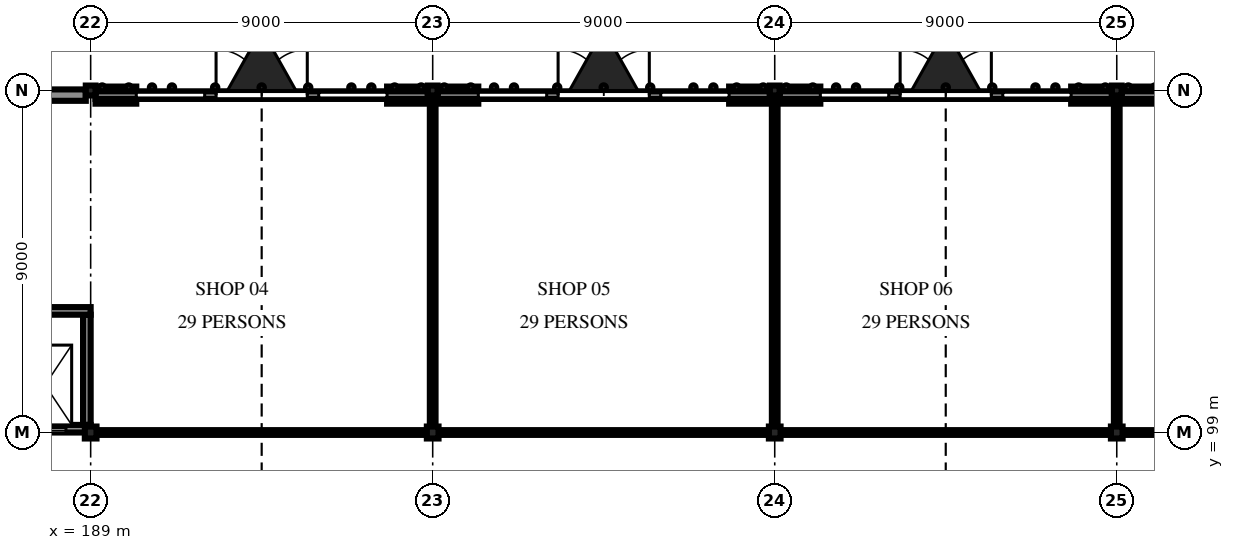
"""IFC4 building model, lengths in metres.
Left out: names, types, materials, properties, quantities, classifications, styles, units other than length and angle.
Written with IfcOpenShell. Run it as: python <this file> out.ifc"""

import sys

from ifc_helpers import new_model, si_unit, direction, frame, frame_2d, origin, origin_2d, place, context, subcontext, project, spatial, polyline, rectangle, i_section, outline, extrude, element, fill, save


model = new_model("IFC4")
c1 = context("Model", 3, precision=1e-05, world=origin(), true_north=direction((0.0, 1.0)))
c2 = subcontext(c1, "Body", "Model", "MODEL_VIEW")
j1 = project(units=[si_unit("LENGTHUNIT", "METRE"), si_unit("PLANEANGLEUNIT", "RADIAN")], contexts=[c1])
p1 = place(None, origin())
s1 = spatial("IfcSite", under=j1, at=p1, CompositionType="ELEMENT")
p2 = place(p1, origin())
s2 = spatial("IfcBuilding", under=s1, at=p2, CompositionType="ELEMENT")
p3 = place(p2, origin())
s3 = spatial("IfcBuildingStorey", under=s2, at=p3, CompositionType="ELEMENT", Elevation=0.0)
p4 = place(p3, frame((189.0, 99.0, -2.1), z_axis=(0.0, 0.0, 1.0), x_axis=(1.0, 0.0, 0.0)))
e1 = element("IfcColumn", 1, at=p4, inside=s3, PredefinedType="COLUMN", context=c2, shape_type="SweptSolid", body=[
    extrude(i_section(OverallWidth=0.307, OverallDepth=0.314, WebThickness=0.012, FlangeThickness=0.019, FilletRadius=0.015, at=origin_2d()), origin(), (0.0, 0.0, 1.0), 9.6),
])
p5 = place(p3, frame((189.0, 108.0, -2.1), z_axis=(0.0, 0.0, 1.0), x_axis=(1.0, 0.0, 0.0)))
e2 = element("IfcColumn", 2, at=p5, inside=s3, PredefinedType="COLUMN", context=c2, shape_type="SweptSolid", body=[
    extrude(i_section(OverallWidth=0.256, OverallDepth=0.26, WebThickness=0.01, FlangeThickness=0.017, FilletRadius=0.013, at=origin_2d()), origin(), (0.0, 0.0, 1.0), 9.6),
])
p6 = place(p3, frame((198.0, 99.0, -2.1), z_axis=(0.0, 0.0, 1.0), x_axis=(1.0, 0.0, 0.0)))
e3 = element("IfcColumn", 3, at=p6, inside=s3, PredefinedType="COLUMN", context=c2, shape_type="SweptSolid", body=[
    extrude(i_section(OverallWidth=0.307, OverallDepth=0.314, WebThickness=0.012, FlangeThickness=0.019, FilletRadius=0.015, at=origin_2d()), origin(), (0.0, 0.0, 1.0), 9.6),
])
p7 = place(p3, frame((198.0, 108.0, -2.1), z_axis=(0.0, 0.0, 1.0), x_axis=(1.0, 0.0, 0.0)))
e4 = element("IfcColumn", 4, at=p7, inside=s3, PredefinedType="COLUMN", context=c2, shape_type="SweptSolid", body=[
    extrude(i_section(OverallWidth=0.256, OverallDepth=0.26, WebThickness=0.01, FlangeThickness=0.017, FilletRadius=0.013, at=origin_2d()), origin(), (0.0, 0.0, 1.0), 9.6),
])
p8 = place(p3, frame((207.0, 99.0, -2.1), z_axis=(0.0, 0.0, 1.0), x_axis=(1.0, 0.0, 0.0)))
e5 = element("IfcColumn", 5, at=p8, inside=s3, PredefinedType="COLUMN", context=c2, shape_type="SweptSolid", body=[
    extrude(i_section(OverallWidth=0.307, OverallDepth=0.314, WebThickness=0.012, FlangeThickness=0.019, FilletRadius=0.015, at=origin_2d()), origin(), (0.0, 0.0, 1.0), 9.6),
])
p9 = place(p3, frame((207.0, 108.0, -2.1), z_axis=(0.0, 0.0, 1.0), x_axis=(1.0, 0.0, 0.0)))
e6 = element("IfcColumn", 6, at=p9, inside=s3, PredefinedType="COLUMN", context=c2, shape_type="SweptSolid", body=[
    extrude(i_section(OverallWidth=0.256, OverallDepth=0.26, WebThickness=0.01, FlangeThickness=0.017, FilletRadius=0.013, at=origin_2d()), origin(), (0.0, 0.0, 1.0), 9.6),
])
p10 = place(p3, frame((216.0, 99.0, -2.1), z_axis=(0.0, 0.0, 1.0), x_axis=(1.0, 0.0, 0.0)))
e7 = element("IfcColumn", 7, at=p10, inside=s3, PredefinedType="COLUMN", context=c2, shape_type="SweptSolid", body=[
    extrude(i_section(OverallWidth=0.307, OverallDepth=0.314, WebThickness=0.012, FlangeThickness=0.019, FilletRadius=0.015, at=origin_2d()), origin(), (0.0, 0.0, 1.0), 9.6),
])
p11 = place(p3, frame((216.0, 108.0, -2.1), z_axis=(0.0, 0.0, 1.0), x_axis=(1.0, 0.0, 0.0)))
e8 = element("IfcColumn", 8, at=p11, inside=s3, PredefinedType="COLUMN", context=c2, shape_type="SweptSolid", body=[
    extrude(i_section(OverallWidth=0.256, OverallDepth=0.26, WebThickness=0.01, FlangeThickness=0.017, FilletRadius=0.013, at=origin_2d()), origin(), (0.0, 0.0, 1.0), 9.6),
])
p12 = place(p3, frame((180.128, 107.878, 0.0), z_axis=(0.0, 0.0, 1.0), x_axis=(1.0, 0.0, 0.0)))
e9 = element("IfcWall", 9, at=p12, inside=s3, PredefinedType="SOLIDWALL", context=c2, shape_type="SweptSolid", body=[
    extrude(rectangle(XDim=8.744, YDim=0.3, at=frame_2d((4.372, 0.0))), origin(), (0.0, 0.0, 1.0), 6.692),
])
p13 = place(p12, frame((0.472, 0.0, 0.0)))
e10 = element("IfcOpeningElement", 10, at=p13, cuts=e9, PredefinedType="OPENING", context=c2, shape_type="SweptSolid", body=[
    extrude(rectangle(XDim=1.8, YDim=2.4, at=frame_2d((0.9, 1.2))), frame((0.0, 0.16, 0.0), z_axis=(0.0, -1.0, 0.0), x_axis=(1.0, 0.0, 0.0)), (0.0, 0.0, 1.0), 0.32),
])
p14 = place(p12, frame((0.772, 0.0, 2.55)))
e11 = element("IfcOpeningElement", 11, at=p14, cuts=e9, PredefinedType="OPENING", context=c2, shape_type="SweptSolid", body=[
    extrude(rectangle(XDim=1.2, YDim=0.6, at=frame_2d((0.6, 0.3))), frame((0.0, 0.16, 0.0), z_axis=(0.0, -1.0, 0.0), x_axis=(1.0, 0.0, 0.0)), (0.0, 0.0, 1.0), 0.32),
])
p15 = place(p12, frame((3.922, 0.0, 1.2)))
e12 = element("IfcOpeningElement", 12, at=p15, cuts=e9, PredefinedType="OPENING", context=c2, shape_type="SweptSolid", body=[
    extrude(rectangle(XDim=0.9, YDim=1.8, at=frame_2d((0.45, 0.9))), frame((0.0, 0.16, 0.0), z_axis=(0.0, -1.0, 0.0), x_axis=(1.0, 0.0, 0.0)), (0.0, 0.0, 1.0), 0.32),
])
p16 = place(p3, frame((189.128, 107.878, 0.0), z_axis=(0.0, 0.0, 1.0), x_axis=(1.0, 0.0, 0.0)))
e13 = element("IfcWall", 13, at=p16, inside=s3, PredefinedType="SOLIDWALL", context=c2, shape_type="SweptSolid", body=[
    extrude(rectangle(XDim=1.072, YDim=0.45, at=frame_2d((0.536, 0.0))), origin(), (0.0, 0.0, 1.0), 4.5),
])
p17 = place(p3, frame((192.0, 107.878, 0.0), z_axis=(0.0, 0.0, 1.0), x_axis=(1.0, 0.0, 0.0)))
e14 = element("IfcWall", 14, at=p17, inside=s3, PredefinedType="ELEMENTEDWALL", context=c2, shape_type="SweptSolid", body=[
    extrude(rectangle(XDim=3.0, YDim=0.15, at=frame_2d((1.5, 0.0))), origin(), (0.0, 0.0, 1.0), 4.5),
])
p18 = place(p17, frame((0.3, 0.0, 0.0)))
e15 = element("IfcOpeningElement", 15, at=p18, cuts=e14, PredefinedType="OPENING", context=c2, shape_type="SweptSolid", body=[
    extrude(rectangle(XDim=2.4, YDim=2.7, at=frame_2d((1.2, 1.35))), frame((0.0, 0.085, 0.0), z_axis=(0.0, -1.0, 0.0), x_axis=(1.0, 0.0, 0.0)), (0.0, 0.0, 1.0), 0.17),
])
p19 = place(p3, frame((196.8, 107.878, 0.0), z_axis=(0.0, 0.0, 1.0), x_axis=(1.0, 0.0, 0.0)))
e16 = element("IfcWall", 16, at=p19, inside=s3, PredefinedType="SOLIDWALL", context=c2, shape_type="SweptSolid", body=[
    extrude(rectangle(XDim=1.072, YDim=0.45, at=frame_2d((0.536, 0.0))), origin(), (0.0, 0.0, 1.0), 4.5),
])
p20 = place(p3, frame((189.128, 107.878, 4.9), z_axis=(0.0, 0.0, 1.0), x_axis=(1.0, 0.0, 0.0)))
e17 = element("IfcWall", 17, at=p20, inside=s3, PredefinedType="SOLIDWALL", context=c2, shape_type="SweptSolid", body=[
    extrude(rectangle(XDim=8.744, YDim=0.2, at=frame_2d((4.372, 0.0))), origin(), (0.0, 0.0, 1.0), 1.792),
])
p21 = place(p3, frame((198.128, 107.878, 0.0), z_axis=(0.0, 0.0, 1.0), x_axis=(1.0, 0.0, 0.0)))
e18 = element("IfcWall", 18, at=p21, inside=s3, PredefinedType="SOLIDWALL", context=c2, shape_type="SweptSolid", body=[
    extrude(rectangle(XDim=1.072, YDim=0.45, at=frame_2d((0.536, 0.0))), origin(), (0.0, 0.0, 1.0), 4.5),
])
p22 = place(p3, frame((201.0, 107.878, 0.0), z_axis=(0.0, 0.0, 1.0), x_axis=(1.0, 0.0, 0.0)))
e19 = element("IfcWall", 19, at=p22, inside=s3, PredefinedType="ELEMENTEDWALL", context=c2, shape_type="SweptSolid", body=[
    extrude(rectangle(XDim=3.0, YDim=0.15, at=frame_2d((1.5, 0.0))), origin(), (0.0, 0.0, 1.0), 4.5),
])
p23 = place(p22, frame((0.3, 0.0, 0.0)))
e20 = element("IfcOpeningElement", 20, at=p23, cuts=e19, PredefinedType="OPENING", context=c2, shape_type="SweptSolid", body=[
    extrude(rectangle(XDim=2.4, YDim=2.7, at=frame_2d((1.2, 1.35))), frame((0.0, 0.085, 0.0), z_axis=(0.0, -1.0, 0.0), x_axis=(1.0, 0.0, 0.0)), (0.0, 0.0, 1.0), 0.17),
])
p24 = place(p3, frame((205.8, 107.878, 0.0), z_axis=(0.0, 0.0, 1.0), x_axis=(1.0, 0.0, 0.0)))
e21 = element("IfcWall", 21, at=p24, inside=s3, PredefinedType="SOLIDWALL", context=c2, shape_type="SweptSolid", body=[
    extrude(rectangle(XDim=1.072, YDim=0.45, at=frame_2d((0.536, 0.0))), origin(), (0.0, 0.0, 1.0), 4.5),
])
p25 = place(p3, frame((198.128, 107.878, 4.9), z_axis=(0.0, 0.0, 1.0), x_axis=(1.0, 0.0, 0.0)))
e22 = element("IfcWall", 22, at=p25, inside=s3, PredefinedType="SOLIDWALL", context=c2, shape_type="SweptSolid", body=[
    extrude(rectangle(XDim=8.744, YDim=0.2, at=frame_2d((4.372, 0.0))), origin(), (0.0, 0.0, 1.0), 1.792),
])
p26 = place(p3, frame((207.128, 107.878, 0.0), z_axis=(0.0, 0.0, 1.0), x_axis=(1.0, 0.0, 0.0)))
e23 = element("IfcWall", 23, at=p26, inside=s3, PredefinedType="SOLIDWALL", context=c2, shape_type="SweptSolid", body=[
    extrude(rectangle(XDim=1.072, YDim=0.45, at=frame_2d((0.536, 0.0))), origin(), (0.0, 0.0, 1.0), 4.5),
])
p27 = place(p3, frame((210.0, 107.878, 0.0), z_axis=(0.0, 0.0, 1.0), x_axis=(1.0, 0.0, 0.0)))
e24 = element("IfcWall", 24, at=p27, inside=s3, PredefinedType="ELEMENTEDWALL", context=c2, shape_type="SweptSolid", body=[
    extrude(rectangle(XDim=3.0, YDim=0.15, at=frame_2d((1.5, 0.0))), origin(), (0.0, 0.0, 1.0), 4.5),
])
p28 = place(p27, frame((0.3, 0.0, 0.0)))
e25 = element("IfcOpeningElement", 25, at=p28, cuts=e24, PredefinedType="OPENING", context=c2, shape_type="SweptSolid", body=[
    extrude(rectangle(XDim=2.4, YDim=2.7, at=frame_2d((1.2, 1.35))), frame((0.0, 0.085, 0.0), z_axis=(0.0, -1.0, 0.0), x_axis=(1.0, 0.0, 0.0)), (0.0, 0.0, 1.0), 0.17),
])
p29 = place(p3, frame((214.8, 107.878, 0.0), z_axis=(0.0, 0.0, 1.0), x_axis=(1.0, 0.0, 0.0)))
e26 = element("IfcWall", 26, at=p29, inside=s3, PredefinedType="SOLIDWALL", context=c2, shape_type="SweptSolid", body=[
    extrude(rectangle(XDim=1.072, YDim=0.45, at=frame_2d((0.536, 0.0))), origin(), (0.0, 0.0, 1.0), 4.5),
])
p30 = place(p3, frame((207.128, 107.878, 4.9), z_axis=(0.0, 0.0, 1.0), x_axis=(1.0, 0.0, 0.0)))
e27 = element("IfcWall", 27, at=p30, inside=s3, PredefinedType="SOLIDWALL", context=c2, shape_type="SweptSolid", body=[
    extrude(rectangle(XDim=8.744, YDim=0.2, at=frame_2d((4.372, 0.0))), origin(), (0.0, 0.0, 1.0), 1.792),
])
p31 = place(p3, frame((216.128, 107.878, 0.0), z_axis=(0.0, 0.0, 1.0), x_axis=(1.0, 0.0, 0.0)))
e28 = element("IfcWall", 28, at=p31, inside=s3, PredefinedType="SOLIDWALL", context=c2, shape_type="SweptSolid", body=[
    extrude(rectangle(XDim=1.072, YDim=0.45, at=frame_2d((0.536, 0.0))), origin(), (0.0, 0.0, 1.0), 4.5),
])
p32 = place(p3, frame((216.128, 107.878, 4.9), z_axis=(0.0, 0.0, 1.0), x_axis=(1.0, 0.0, 0.0)))
e29 = element("IfcWall", 29, at=p32, inside=s3, PredefinedType="SOLIDWALL", context=c2, shape_type="SweptSolid", body=[
    extrude(rectangle(XDim=8.744, YDim=0.2, at=frame_2d((4.372, 0.0))), origin(), (0.0, 0.0, 1.0), 1.792),
])
p33 = place(p3, frame((186.602, 99.1, -1.6), z_axis=(0.0, 0.0, 1.0), x_axis=(1.0, 0.0, 0.0)))
e30 = element("IfcWall", 30, at=p33, inside=s3, PredefinedType="SOLIDWALL", context=c2, shape_type="SweptSolid", body=[
    extrude(rectangle(XDim=2.398, YDim=0.2, at=frame_2d((1.199, 0.0))), origin(), (0.0, 0.0, 1.0), 8.357),
])
p34 = place(p33, frame((0.648, 0.0, 1.6)))
e31 = element("IfcOpeningElement", 31, at=p34, cuts=e30, PredefinedType="OPENING", context=c2, shape_type="SweptSolid", body=[
    extrude(rectangle(XDim=1.1, YDim=2.1, at=frame_2d((0.55, 1.05))), frame((0.0, 0.11, 0.0), z_axis=(0.0, -1.0, 0.0), x_axis=(1.0, 0.0, 0.0)), (0.0, 0.0, 1.0), 0.22),
])
p35 = place(p3, frame((186.602, 102.2, -1.6), z_axis=(0.0, 0.0, 1.0), x_axis=(1.0, 0.0, 0.0)))
e32 = element("IfcWall", 32, at=p35, inside=s3, PredefinedType="SOLIDWALL", context=c2, shape_type="SweptSolid", body=[
    extrude(rectangle(XDim=2.398, YDim=0.2, at=frame_2d((1.199, 0.0))), origin(), (0.0, 0.0, 1.0), 8.357),
])
p36 = place(p3, frame((188.9, 99.2, -1.6), z_axis=(0.0, 0.0, 1.0), x_axis=(0.0, 1.0, 0.0)))
e33 = element("IfcWall", 33, at=p36, inside=s3, PredefinedType="SOLIDWALL", context=c2, shape_type="SweptSolid", body=[
    extrude(rectangle(XDim=2.9, YDim=0.2, at=frame_2d((1.45, 0.0))), origin(), (0.0, 0.0, 1.0), 8.357),
])
for number, where, z_axis, x_axis in (
    (34, (207.154, 99.0, 0.0), (0.0, 0.0, 1.0), (1.0, 0.0, 0.0)),
    (35, (216.154, 99.0, 0.0), (0.0, 0.0, 1.0), (1.0, 0.0, 0.0)),
    (36, (198.154, 99.0, 0.0), (0.0, 0.0, 1.0), (1.0, 0.0, 0.0)),
    (37, (189.154, 99.0, 0.0), (0.0, 0.0, 1.0), (1.0, 0.0, 0.0)),
):
    element("IfcWall", number, at=place(p3, frame(where, z_axis=z_axis, x_axis=x_axis)), inside=s3, PredefinedType="PARTITIONING", context=c2, shape_type="SweptSolid", body=[
        extrude(rectangle(XDim=8.692, YDim=0.125, at=frame_2d((4.346, 0.0))), origin(), (0.0, 0.0, 1.0), 6.757),
    ])
for number, where, z_axis, x_axis in (
    (38, (198.0, 107.87, 0.0), (0.0, 0.0, 1.0), (0.0, -1.0, 0.0)),
    (39, (207.0, 107.87, 0.0), (0.0, 0.0, 1.0), (0.0, -1.0, 0.0)),
    (40, (216.0, 107.87, 0.0), (0.0, 0.0, 1.0), (0.0, -1.0, 0.0)),
):
    element("IfcWall", number, at=place(p3, frame(where, z_axis=z_axis, x_axis=x_axis)), inside=s3, PredefinedType="PARTITIONING", context=c2, shape_type="SweptSolid", body=[
        extrude(rectangle(XDim=8.713, YDim=0.15, at=frame_2d((4.356, 0.0))), origin(), (0.0, 0.0, 1.0), 6.6),
    ])
p37 = place(p18, origin())
e41 = element("IfcDoor", 41, at=p37, inside=s3, OperationType="DOUBLE_DOOR_SINGLE_SWING", PredefinedType="DOOR", context=c2, shape_type="SweptSolid", body=[
    extrude(outline(polyline([(0.0, 0.0), (0.07, 0.0), (0.07, 2.63), (2.33, 2.63), (2.33, 0.0), (2.4, 0.0), (2.4, 2.7), (0.0, 2.7), (0.0, 0.0)])), frame((0.0, 0.025, 0.0), z_axis=(0.0, -1.0, 0.0), x_axis=(1.0, 0.0, 0.0)), (0.0, 0.0, 1.0), 0.05),
    extrude(outline(polyline([(0.074, 0.01), (1.197, 0.01), (1.197, 2.626), (0.074, 2.626), (0.074, 0.01)]), holes=[polyline([(0.164, 0.31), (1.107, 0.31), (1.107, 2.536), (0.164, 2.536), (0.164, 0.31)])]), frame((0.0, 0.017, 0.0), z_axis=(0.0, -1.0, 0.0), x_axis=(1.0, 0.0, 0.0)), (0.0, 0.0, 1.0), 0.035),
    extrude(rectangle(XDim=0.943, YDim=2.226, at=frame_2d((0.635, 1.423))), frame((0.0, 0.006, 0.0), z_axis=(0.0, -1.0, 0.0), x_axis=(1.0, 0.0, 0.0)), (0.0, 0.0, 1.0), 0.012),
    extrude(outline(polyline([(1.203, 0.01), (2.326, 0.01), (2.326, 2.626), (1.203, 2.626), (1.203, 0.01)]), holes=[polyline([(1.293, 0.31), (2.236, 0.31), (2.236, 2.536), (1.293, 2.536), (1.293, 0.31)])]), frame((0.0, 0.017, 0.0), z_axis=(0.0, -1.0, 0.0), x_axis=(1.0, 0.0, 0.0)), (0.0, 0.0, 1.0), 0.035),
    extrude(rectangle(XDim=0.943, YDim=2.226, at=frame_2d((1.764, 1.423))), frame((0.0, 0.006, 0.0), z_axis=(0.0, -1.0, 0.0), x_axis=(1.0, 0.0, 0.0)), (0.0, 0.0, 1.0), 0.012),
])
fill(e15, e41)
p38 = place(p23, origin())
e42 = element("IfcDoor", 42, at=p38, inside=s3, OperationType="DOUBLE_DOOR_SINGLE_SWING", PredefinedType="DOOR", context=c2, shape_type="SweptSolid", body=[
    extrude(outline(polyline([(0.0, 0.0), (0.07, 0.0), (0.07, 2.63), (2.33, 2.63), (2.33, 0.0), (2.4, 0.0), (2.4, 2.7), (0.0, 2.7), (0.0, 0.0)])), frame((0.0, 0.025, 0.0), z_axis=(0.0, -1.0, 0.0), x_axis=(1.0, 0.0, 0.0)), (0.0, 0.0, 1.0), 0.05),
    extrude(outline(polyline([(0.074, 0.01), (1.197, 0.01), (1.197, 2.626), (0.074, 2.626), (0.074, 0.01)]), holes=[polyline([(0.164, 0.31), (1.107, 0.31), (1.107, 2.536), (0.164, 2.536), (0.164, 0.31)])]), frame((0.0, 0.017, 0.0), z_axis=(0.0, -1.0, 0.0), x_axis=(1.0, 0.0, 0.0)), (0.0, 0.0, 1.0), 0.035),
    extrude(rectangle(XDim=0.943, YDim=2.226, at=frame_2d((0.635, 1.423))), frame((0.0, 0.006, 0.0), z_axis=(0.0, -1.0, 0.0), x_axis=(1.0, 0.0, 0.0)), (0.0, 0.0, 1.0), 0.012),
    extrude(outline(polyline([(1.203, 0.01), (2.326, 0.01), (2.326, 2.626), (1.203, 2.626), (1.203, 0.01)]), holes=[polyline([(1.293, 0.31), (2.236, 0.31), (2.236, 2.536), (1.293, 2.536), (1.293, 0.31)])]), frame((0.0, 0.017, 0.0), z_axis=(0.0, -1.0, 0.0), x_axis=(1.0, 0.0, 0.0)), (0.0, 0.0, 1.0), 0.035),
    extrude(rectangle(XDim=0.943, YDim=2.226, at=frame_2d((1.764, 1.423))), frame((0.0, 0.006, 0.0), z_axis=(0.0, -1.0, 0.0), x_axis=(1.0, 0.0, 0.0)), (0.0, 0.0, 1.0), 0.012),
])
fill(e20, e42)
p39 = place(p28, origin())
e43 = element("IfcDoor", 43, at=p39, inside=s3, OperationType="DOUBLE_DOOR_SINGLE_SWING", PredefinedType="DOOR", context=c2, shape_type="SweptSolid", body=[
    extrude(outline(polyline([(0.0, 0.0), (0.07, 0.0), (0.07, 2.63), (2.33, 2.63), (2.33, 0.0), (2.4, 0.0), (2.4, 2.7), (0.0, 2.7), (0.0, 0.0)])), frame((0.0, 0.025, 0.0), z_axis=(0.0, -1.0, 0.0), x_axis=(1.0, 0.0, 0.0)), (0.0, 0.0, 1.0), 0.05),
    extrude(outline(polyline([(0.074, 0.01), (1.197, 0.01), (1.197, 2.626), (0.074, 2.626), (0.074, 0.01)]), holes=[polyline([(0.164, 0.31), (1.107, 0.31), (1.107, 2.536), (0.164, 2.536), (0.164, 0.31)])]), frame((0.0, 0.017, 0.0), z_axis=(0.0, -1.0, 0.0), x_axis=(1.0, 0.0, 0.0)), (0.0, 0.0, 1.0), 0.035),
    extrude(rectangle(XDim=0.943, YDim=2.226, at=frame_2d((0.635, 1.423))), frame((0.0, 0.006, 0.0), z_axis=(0.0, -1.0, 0.0), x_axis=(1.0, 0.0, 0.0)), (0.0, 0.0, 1.0), 0.012),
    extrude(outline(polyline([(1.203, 0.01), (2.326, 0.01), (2.326, 2.626), (1.203, 2.626), (1.203, 0.01)]), holes=[polyline([(1.293, 0.31), (2.236, 0.31), (2.236, 2.536), (1.293, 2.536), (1.293, 0.31)])]), frame((0.0, 0.017, 0.0), z_axis=(0.0, -1.0, 0.0), x_axis=(1.0, 0.0, 0.0)), (0.0, 0.0, 1.0), 0.035),
    extrude(rectangle(XDim=0.943, YDim=2.226, at=frame_2d((1.764, 1.423))), frame((0.0, 0.006, 0.0), z_axis=(0.0, -1.0, 0.0), x_axis=(1.0, 0.0, 0.0)), (0.0, 0.0, 1.0), 0.012),
])
fill(e25, e43)
p40 = place(p34, origin())
e44 = element("IfcDoor", 44, at=p40, inside=s3, OperationType="SLIDING_TO_LEFT", PredefinedType="DOOR", context=c2, shape_type="SweptSolid", body=[
    extrude(outline(polyline([(0.0, 0.0), (0.07, 0.0), (0.07, 2.03), (1.03, 2.03), (1.03, 0.0), (1.1, 0.0), (1.1, 2.1), (0.0, 2.1), (0.0, 0.0)])), frame((0.0, 0.025, 0.0), z_axis=(0.0, -1.0, 0.0), x_axis=(1.0, 0.0, 0.0)), (0.0, 0.0, 1.0), 0.05),
    extrude(rectangle(XDim=0.524, YDim=2.016, at=frame_2d((0.336, 1.018))), frame((0.0, 0.018, 0.0), z_axis=(0.0, -1.0, 0.0), x_axis=(1.0, 0.0, 0.0)), (0.0, 0.0, 1.0), 0.016),
    extrude(rectangle(XDim=0.52, YDim=2.016, at=frame_2d((0.766, 1.018))), frame((0.0, -0.002, 0.0), z_axis=(0.0, -1.0, 0.0), x_axis=(1.0, 0.0, 0.0)), (0.0, 0.0, 1.0), 0.016),
])
fill(e31, e44)
save(model, sys.argv[1])
